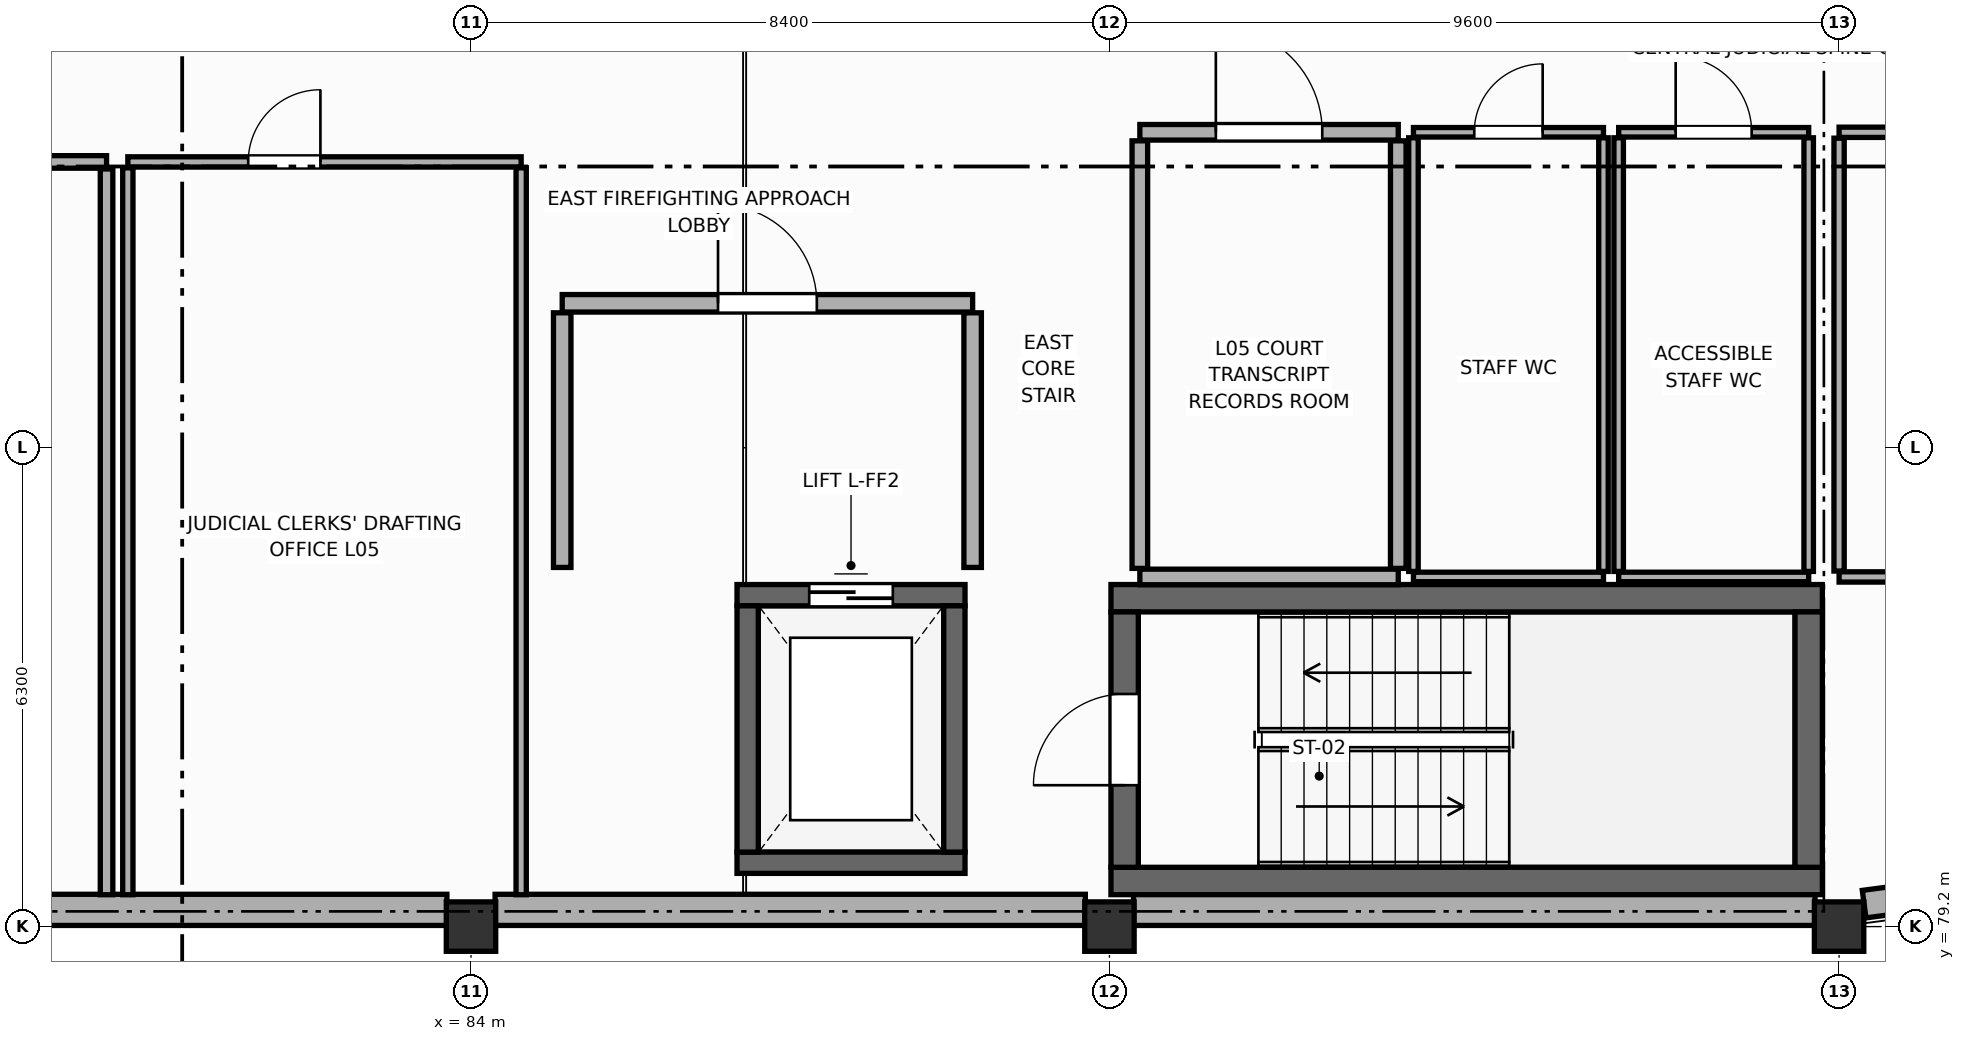
"""IFC4 building model, lengths in metres.
Left out: names, types, materials, properties, quantities, classifications, styles, units other than length and angle.
Written with IfcOpenShell. Run it as: python <this file> out.ifc"""

import sys

from ifc_helpers import new_model, si_unit, direction, frame, frame_2d, origin, origin_2d, place, context, subcontext, project, spatial, rectangle, extrude, element, fill, save


model = new_model("IFC4")
c1 = context("Model", 3, precision=1e-05, world=origin(), true_north=direction((0.0, 1.0)))
c2 = subcontext(c1, "Body", "Model", "MODEL_VIEW")
j1 = project(units=[si_unit("LENGTHUNIT", "METRE"), si_unit("PLANEANGLEUNIT", "RADIAN")], contexts=[c1])
p1 = place(None, origin())
s1 = spatial("IfcSite", under=j1, at=p1, CompositionType="ELEMENT")
p2 = place(p1, origin())
s2 = spatial("IfcBuilding", under=s1, at=p2, CompositionType="ELEMENT")
p3 = place(p2, frame((0.0, 0.0, 18.6)))
s3 = spatial("IfcBuildingStorey", under=s2, at=p3, CompositionType="ELEMENT", Elevation=18.6)
for number, where, z_axis, x_axis in (
    (1, (84.0, 79.2, 0.0), (0.0, 0.0, 1.0), (1.0, 0.0, 0.0)),
    (2, (92.4, 79.2, 0.0), (0.0, 0.0, 1.0), (1.0, 0.0, 0.0)),
    (3, (102.0, 79.2, 0.0), (0.0, 0.0, 1.0), (1.0, 0.0, 0.0)),
):
    element("IfcColumn", number, at=place(p3, frame(where, z_axis=z_axis, x_axis=x_axis)), inside=s3, PredefinedType="COLUMN", context=c2, shape_type="SweptSolid", body=[
        extrude(rectangle(XDim=0.65, YDim=0.65, at=origin_2d()), origin(), (0.0, 0.0, 1.0), 4.2),
    ])
for number, where, z_axis, x_axis in (
    (4, (83.683, 79.42, 0.0), (0.0, 0.0, 1.0), (-1.0, 0.0, 0.0)),
    (5, (92.083, 79.42, 0.0), (0.0, 0.0, 1.0), (-1.0, 0.0, 0.0)),
):
    element("IfcWall", number, at=place(p3, frame(where, z_axis=z_axis, x_axis=x_axis)), inside=s3, PredefinedType="STANDARD", context=c2, shape_type="SweptSolid", body=[
        extrude(rectangle(XDim=7.766, YDim=0.41, at=frame_2d((3.883, 0.0))), origin(), (0.0, 0.0, 1.0), 2.44),
    ])
p4 = place(p3, frame((101.683, 79.42, 0.0), z_axis=(0.0, 0.0, 1.0), x_axis=(-1.0, 0.0, 0.0)))
e6 = element("IfcWall", 6, at=p4, inside=s3, PredefinedType="STANDARD", context=c2, shape_type="SweptSolid", body=[
    extrude(rectangle(XDim=8.966, YDim=0.41, at=frame_2d((4.483, 0.0))), origin(), (0.0, 0.0, 1.0), 2.44),
])
p5 = place(p3, frame((102.329, 79.496, 0.0), z_axis=(0.0, 0.0, 1.0), x_axis=(0.99144889538, 0.13049554724, 0.0)))
e7 = element("IfcWall", 7, at=p5, inside=s3, PredefinedType="ELEMENTEDWALL", context=c2, shape_type="SweptSolid", body=[
    extrude(rectangle(XDim=2.924, YDim=0.365, at=frame_2d((1.462, 0.0))), origin(), (0.0, 0.0, 1.0), 3.09),
])
p6 = place(p5, frame((1.062, 0.0, 0.85)))
e8 = element("IfcOpeningElement", 8, at=p6, cuts=e7, PredefinedType="OPENING", context=c2, shape_type="SweptSolid", body=[
    extrude(rectangle(XDim=0.8, YDim=1.7, at=frame_2d((0.4, 0.85))), frame((0.0, 0.192, 0.0), z_axis=(0.0, -1.0, 0.0), x_axis=(1.0, 0.0, 0.0)), (0.0, 0.0, 1.0), 0.385),
])
for number, where, z_axis, x_axis in (
    (9, (92.42, 83.52, 0.0), (0.0, 0.0, 1.0), (1.0, 0.0, 0.0)),
    (10, (101.78, 79.8, 0.0), (0.0, 0.0, 1.0), (-1.0, 0.0, 0.0)),
):
    element("IfcWall", number, at=place(p3, frame(where, z_axis=z_axis, x_axis=x_axis)), inside=s3, PredefinedType="SHEAR", context=c2, shape_type="SweptSolid", body=[
        extrude(rectangle(XDim=9.36, YDim=0.36, at=frame_2d((4.68, 0.0))), origin(), (0.0, 0.0, 1.0), 3.96),
    ])
p7 = place(p3, frame((92.6, 79.98, 0.0), z_axis=(0.0, 0.0, 1.0), x_axis=(0.0, 1.0, 0.0)))
e11 = element("IfcWall", 11, at=p7, inside=s3, PredefinedType="SHEAR", context=c2, shape_type="SweptSolid", body=[
    extrude(rectangle(XDim=3.36, YDim=0.36, at=frame_2d((1.68, 0.0))), origin(), (0.0, 0.0, 1.0), 3.96),
])
p8 = place(p7, frame((1.08, 0.0, 0.0)))
e12 = element("IfcOpeningElement", 12, at=p8, cuts=e11, PredefinedType="OPENING", context=c2, shape_type="SweptSolid", body=[
    extrude(rectangle(XDim=1.2, YDim=2.2, at=frame_2d((0.6, 1.1))), frame((0.0, 0.19, 0.0), z_axis=(0.0, -1.0, 0.0), x_axis=(1.0, 0.0, 0.0)), (0.0, 0.0, 1.0), 0.38),
])
p9 = place(p3, frame((101.6, 83.34, 0.0), z_axis=(0.0, 0.0, 1.0), x_axis=(0.0, -1.0, 0.0)))
e13 = element("IfcWall", 13, at=p9, inside=s3, PredefinedType="SHEAR", context=c2, shape_type="SweptSolid", body=[
    extrude(rectangle(XDim=3.36, YDim=0.36, at=frame_2d((1.68, 0.0))), origin(), (0.0, 0.0, 1.0), 3.96),
])
p10 = place(p3, frame((87.5, 83.56, 0.0), z_axis=(0.0, 0.0, 1.0), x_axis=(1.0, 0.0, 0.0)))
e14 = element("IfcWall", 14, at=p10, inside=s3, PredefinedType="SHEAR", context=c2, shape_type="SweptSolid", body=[
    extrude(rectangle(XDim=3.0, YDim=0.28, at=frame_2d((1.5, 0.0))), origin(), (0.0, 0.0, 1.0), 3.96),
])
p11 = place(p10, frame((0.95, 0.0, 0.0)))
e15 = element("IfcOpeningElement", 15, at=p11, cuts=e14, PredefinedType="OPENING", context=c2, shape_type="SweptSolid", body=[
    extrude(rectangle(XDim=1.1, YDim=2.2, at=frame_2d((0.55, 1.1))), frame((0.0, 0.15, 0.0), z_axis=(0.0, -1.0, 0.0), x_axis=(1.0, 0.0, 0.0)), (0.0, 0.0, 1.0), 0.3),
])
p12 = place(p3, frame((90.5, 80.04, 0.0), z_axis=(0.0, 0.0, 1.0), x_axis=(-1.0, 0.0, 0.0)))
e16 = element("IfcWall", 16, at=p12, inside=s3, PredefinedType="SHEAR", context=c2, shape_type="SweptSolid", body=[
    extrude(rectangle(XDim=3.0, YDim=0.28, at=frame_2d((1.5, 0.0))), origin(), (0.0, 0.0, 1.0), 3.96),
])
for number, where, z_axis, x_axis in (
    (17, (87.64, 80.18, 0.0), (0.0, 0.0, 1.0), (0.0, 1.0, 0.0)),
    (18, (90.36, 83.42, 0.0), (0.0, 0.0, 1.0), (0.0, -1.0, 0.0)),
):
    element("IfcWall", number, at=place(p3, frame(where, z_axis=z_axis, x_axis=x_axis)), inside=s3, PredefinedType="SHEAR", context=c2, shape_type="SweptSolid", body=[
        extrude(rectangle(XDim=3.24, YDim=0.28, at=frame_2d((1.62, 0.0))), origin(), (0.0, 0.0, 1.0), 3.96),
    ])
p13 = place(p3, frame((85.2, 87.4, 0.0), z_axis=(0.0, 0.0, 1.0), x_axis=(1.0, 0.0, 0.0)))
e19 = element("IfcWall", 19, at=p13, inside=s3, PredefinedType="STANDARD", context=c2, shape_type="SweptSolid", body=[
    extrude(rectangle(XDim=5.4, YDim=0.23, at=frame_2d((2.7, 0.0))), origin(), (0.0, 0.0, 1.0), 3.34),
])
p14 = place(p13, frame((2.05, 0.0, 0.0)))
e20 = element("IfcOpeningElement", 20, at=p14, cuts=e19, PredefinedType="OPENING", context=c2, shape_type="SweptSolid", body=[
    extrude(rectangle(XDim=1.3, YDim=2.2, at=frame_2d((0.65, 1.1))), frame((0.0, 0.125, 0.0), z_axis=(0.0, -1.0, 0.0), x_axis=(1.0, 0.0, 0.0)), (0.0, 0.0, 1.0), 0.25),
])
for number, where, z_axis, x_axis in (
    (21, (85.2, 83.925, 0.0), (0.0, 0.0, 1.0), (0.0, 1.0, 0.0)),
    (22, (90.6, 87.275, 0.0), (0.0, 0.0, 1.0), (0.0, -1.0, 0.0)),
):
    element("IfcWall", number, at=place(p3, frame(where, z_axis=z_axis, x_axis=x_axis)), inside=s3, PredefinedType="STANDARD", context=c2, shape_type="SweptSolid", body=[
        extrude(rectangle(XDim=3.35, YDim=0.23, at=frame_2d((1.675, 0.0))), origin(), (0.0, 0.0, 1.0), 3.34),
    ])
p15 = place(p3, frame((96.4, 89.65, 0.0), z_axis=(0.0, 0.0, 1.0), x_axis=(1.0, 0.0, 0.0)))
e23 = element("IfcWall", 23, at=p15, inside=s3, PredefinedType="PARTITIONING", context=c2, shape_type="SweptSolid", body=[
    extrude(rectangle(XDim=2.5, YDim=0.125, at=frame_2d((1.25, 0.0))), origin(), (0.0, 0.0, 1.0), 3.945),
])
p16 = place(p15, frame((0.8, 0.0, 0.0)))
e24 = element("IfcOpeningElement", 24, at=p16, cuts=e23, PredefinedType="OPENING", context=c2, shape_type="SweptSolid", body=[
    extrude(rectangle(XDim=0.9, YDim=2.1, at=frame_2d((0.45, 1.05))), frame((0.0, 0.073, 0.0), z_axis=(0.0, -1.0, 0.0), x_axis=(1.0, 0.0, 0.0)), (0.0, 0.0, 1.0), 0.145),
])
p17 = place(p3, frame((98.9, 83.8, 0.0), z_axis=(0.0, 0.0, 1.0), x_axis=(-1.0, 0.0, 0.0)))
e25 = element("IfcWall", 25, at=p17, inside=s3, PredefinedType="PARTITIONING", context=c2, shape_type="SweptSolid", body=[
    extrude(rectangle(XDim=2.5, YDim=0.125, at=frame_2d((1.25, 0.0))), origin(), (0.0, 0.0, 1.0), 3.945),
])
for number, where, z_axis, x_axis in (
    (26, (96.4, 83.873, 0.0), (0.0, 0.0, 1.0), (0.0, 1.0, 0.0)),
    (27, (98.9, 89.577, 0.0), (0.0, 0.0, 1.0), (0.0, -1.0, 0.0)),
):
    element("IfcWall", number, at=place(p3, frame(where, z_axis=z_axis, x_axis=x_axis)), inside=s3, PredefinedType="PARTITIONING", context=c2, shape_type="SweptSolid", body=[
        extrude(rectangle(XDim=5.705, YDim=0.125, at=frame_2d((2.853, 0.0))), origin(), (0.0, 0.0, 1.0), 3.34),
    ])
p18 = place(p3, frame((99.1, 89.65, 0.0), z_axis=(0.0, 0.0, 1.0), x_axis=(1.0, 0.0, 0.0)))
e28 = element("IfcWall", 28, at=p18, inside=s3, PredefinedType="PARTITIONING", context=c2, shape_type="SweptSolid", body=[
    extrude(rectangle(XDim=2.5, YDim=0.125, at=frame_2d((1.25, 0.0))), origin(), (0.0, 0.0, 1.0), 3.09),
])
p19 = place(p18, frame((0.75, 0.0, 0.0)))
e29 = element("IfcOpeningElement", 29, at=p19, cuts=e28, PredefinedType="OPENING", context=c2, shape_type="SweptSolid", body=[
    extrude(rectangle(XDim=1.0, YDim=2.1, at=frame_2d((0.5, 1.05))), frame((0.0, 0.073, 0.0), z_axis=(0.0, -1.0, 0.0), x_axis=(1.0, 0.0, 0.0)), (0.0, 0.0, 1.0), 0.145),
])
p20 = place(p3, frame((101.6, 83.8, 0.0), z_axis=(0.0, 0.0, 1.0), x_axis=(-1.0, 0.0, 0.0)))
e30 = element("IfcWall", 30, at=p20, inside=s3, PredefinedType="PARTITIONING", context=c2, shape_type="SweptSolid", body=[
    extrude(rectangle(XDim=2.5, YDim=0.125, at=frame_2d((1.25, 0.0))), origin(), (0.0, 0.0, 1.0), 3.09),
])
p21 = place(p3, frame((99.1, 83.873, 0.0), z_axis=(0.0, 0.0, 1.0), x_axis=(0.0, 1.0, 0.0)))
e31 = element("IfcWall", 31, at=p21, inside=s3, PredefinedType="PARTITIONING", context=c2, shape_type="SweptSolid", body=[
    extrude(rectangle(XDim=5.705, YDim=0.125, at=frame_2d((2.853, 0.0))), origin(), (0.0, 0.0, 1.0), 3.34),
])
p22 = place(p3, frame((101.6, 89.577, 0.0), z_axis=(0.0, 0.0, 1.0), x_axis=(0.0, -1.0, 0.0)))
e32 = element("IfcWall", 32, at=p22, inside=s3, PredefinedType="PARTITIONING", context=c2, shape_type="SweptSolid", body=[
    extrude(rectangle(XDim=5.705, YDim=0.125, at=frame_2d((2.853, 0.0))), origin(), (0.0, 0.0, 1.0), 3.09),
])
p23 = place(p3, frame((92.8, 89.65, 0.0), z_axis=(0.0, 0.0, 1.0), x_axis=(1.0, 0.0, 0.0)))
e33 = element("IfcWall", 33, at=p23, inside=s3, PredefinedType="STANDARD", context=c2, shape_type="SweptSolid", body=[
    extrude(rectangle(XDim=3.4, YDim=0.205, at=frame_2d((1.7, 0.0))), origin(), (0.0, 0.0, 1.0), 2.44),
])
p24 = place(p23, frame((1.0, 0.0, 0.0)))
e34 = element("IfcOpeningElement", 34, at=p24, cuts=e33, PredefinedType="OPENING", context=c2, shape_type="SweptSolid", body=[
    extrude(rectangle(XDim=1.4, YDim=2.25, at=frame_2d((0.7, 1.125))), frame((0.0, 0.113, 0.0), z_axis=(0.0, -1.0, 0.0), x_axis=(1.0, 0.0, 0.0)), (0.0, 0.0, 1.0), 0.225),
])
p25 = place(p3, frame((96.2, 83.8, 0.0), z_axis=(0.0, 0.0, 1.0), x_axis=(-1.0, 0.0, 0.0)))
e35 = element("IfcWall", 35, at=p25, inside=s3, PredefinedType="STANDARD", context=c2, shape_type="SweptSolid", body=[
    extrude(rectangle(XDim=3.4, YDim=0.205, at=frame_2d((1.7, 0.0))), origin(), (0.0, 0.0, 1.0), 2.44),
])
p26 = place(p3, frame((92.8, 83.913, 0.0), z_axis=(0.0, 0.0, 1.0), x_axis=(0.0, 1.0, 0.0)))
e36 = element("IfcWall", 36, at=p26, inside=s3, PredefinedType="STANDARD", context=c2, shape_type="SweptSolid", body=[
    extrude(rectangle(XDim=5.625, YDim=0.205, at=frame_2d((2.812, 0.0))), origin(), (0.0, 0.0, 1.0), 2.44),
])
p27 = place(p3, frame((96.2, 89.538, 0.0), z_axis=(0.0, 0.0, 1.0), x_axis=(0.0, -1.0, 0.0)))
e37 = element("IfcWall", 37, at=p27, inside=s3, PredefinedType="STANDARD", context=c2, shape_type="SweptSolid", body=[
    extrude(rectangle(XDim=5.625, YDim=0.205, at=frame_2d((2.812, 0.0))), origin(), (0.0, 0.0, 1.0), 3.34),
])
p28 = place(p3, frame((74.94, 89.26, 0.0), z_axis=(0.0, 0.0, 1.0), x_axis=(1.0, 0.0, 0.0)))
e38 = element("IfcWall", 38, at=p28, inside=s3, PredefinedType="PARTITIONING", context=c2, shape_type="SweptSolid", body=[
    extrude(rectangle(XDim=4.265, YDim=0.165, at=frame_2d((2.133, 0.0))), origin(), (0.0, 0.0, 1.0), 2.44),
])
p29 = place(p28, frame((1.761, 0.0, 0.0)))
e39 = element("IfcOpeningElement", 39, at=p29, cuts=e38, PredefinedType="OPENING", context=c2, shape_type="SweptSolid", body=[
    extrude(rectangle(XDim=1.0, YDim=2.15, at=frame_2d((0.5, 1.075))), frame((0.0, 0.093, 0.0), z_axis=(0.0, -1.0, 0.0), x_axis=(1.0, 0.0, 0.0)), (0.0, 0.0, 1.0), 0.185),
])
p30 = place(p3, frame((79.205, 89.167, 0.0), z_axis=(0.0, 0.0, 1.0), x_axis=(0.0, -1.0, 0.0)))
e40 = element("IfcWall", 40, at=p30, inside=s3, PredefinedType="PARTITIONING", context=c2, shape_type="SweptSolid", body=[
    extrude(rectangle(XDim=9.549, YDim=0.165, at=frame_2d((4.774, 0.0))), origin(), (0.0, 0.0, 1.0), 3.34),
])
p31 = place(p3, frame((79.485, 89.26, 0.0), z_axis=(0.0, 0.0, 1.0), x_axis=(1.0, 0.0, 0.0)))
e41 = element("IfcWall", 41, at=p31, inside=s3, PredefinedType="PARTITIONING", context=c2, shape_type="SweptSolid", body=[
    extrude(rectangle(XDim=5.175, YDim=0.135, at=frame_2d((2.587, 0.0))), origin(), (0.0, 0.0, 1.0), 2.44),
])
p32 = place(p31, frame((1.584, 0.0, 0.0)))
e42 = element("IfcOpeningElement", 42, at=p32, cuts=e41, PredefinedType="OPENING", context=c2, shape_type="SweptSolid", body=[
    extrude(rectangle(XDim=0.95, YDim=2.15, at=frame_2d((0.475, 1.075))), frame((0.0, 0.077, 0.0), z_axis=(0.0, -1.0, 0.0), x_axis=(1.0, 0.0, 0.0)), (0.0, 0.0, 1.0), 0.155),
])
p33 = place(p3, frame((79.485, 79.619, 0.0), z_axis=(0.0, 0.0, 1.0), x_axis=(0.0, 1.0, 0.0)))
e43 = element("IfcWall", 43, at=p33, inside=s3, PredefinedType="PARTITIONING", context=c2, shape_type="SweptSolid", body=[
    extrude(rectangle(XDim=9.564, YDim=0.135, at=frame_2d((4.782, 0.0))), origin(), (0.0, 0.0, 1.0), 3.34),
])
p34 = place(p3, frame((84.66, 89.183, 0.0), z_axis=(0.0, 0.0, 1.0), x_axis=(0.0, -1.0, 0.0)))
e44 = element("IfcWall", 44, at=p34, inside=s3, PredefinedType="PARTITIONING", context=c2, shape_type="SweptSolid", body=[
    extrude(rectangle(XDim=9.564, YDim=0.135, at=frame_2d((4.782, 0.0))), origin(), (0.0, 0.0, 1.0), 2.44),
])
p35 = place(p3, frame((102.0, 89.65, 0.0), z_axis=(0.0, 0.0, 1.0), x_axis=(1.0, 0.0, 0.0)))
e45 = element("IfcWall", 45, at=p35, inside=s3, PredefinedType="PARTITIONING", context=c2, shape_type="SweptSolid", body=[
    extrude(rectangle(XDim=9.5, YDim=0.135, at=frame_2d((4.75, 0.0))), origin(), (0.0, 0.0, 1.0), 2.99),
])
p36 = place(p35, frame((1.92, 0.0, 0.0)))
e46 = element("IfcOpeningElement", 46, at=p36, cuts=e45, PredefinedType="OPENING", context=c2, shape_type="SweptSolid", body=[
    extrude(rectangle(XDim=0.95, YDim=2.15, at=frame_2d((0.475, 1.075))), frame((0.0, 0.077, 0.0), z_axis=(0.0, -1.0, 0.0), x_axis=(1.0, 0.0, 0.0)), (0.0, 0.0, 1.0), 0.155),
])
p37 = place(p3, frame((111.5, 83.8, 0.0), z_axis=(0.0, 0.0, 1.0), x_axis=(-1.0, 0.0, 0.0)))
e47 = element("IfcWall", 47, at=p37, inside=s3, PredefinedType="PARTITIONING", context=c2, shape_type="SweptSolid", body=[
    extrude(rectangle(XDim=9.5, YDim=0.135, at=frame_2d((4.75, 0.0))), origin(), (0.0, 0.0, 1.0), 2.99),
])
p38 = place(p3, frame((102.0, 83.877, 0.0), z_axis=(0.0, 0.0, 1.0), x_axis=(0.0, 1.0, 0.0)))
e48 = element("IfcWall", 48, at=p38, inside=s3, PredefinedType="PARTITIONING", context=c2, shape_type="SweptSolid", body=[
    extrude(rectangle(XDim=5.695, YDim=0.135, at=frame_2d((2.848, 0.0))), origin(), (0.0, 0.0, 1.0), 3.09),
])
p39 = place(p8, origin())
e49 = element("IfcDoor", 49, at=p39, inside=s3, OperationType="SINGLE_SWING_LEFT", PredefinedType="DOOR", context=c2, shape_type="SweptSolid", body=[
    extrude(rectangle(XDim=1.2, YDim=2.2, at=frame_2d((0.6, 1.1))), frame((0.0, 0.025, 0.0), z_axis=(0.0, -1.0, 0.0), x_axis=(1.0, 0.0, 0.0)), (0.0, 0.0, 1.0), 0.05),
])
fill(e12, e49)
p40 = place(p11, origin())
e50 = element("IfcDoor", 50, at=p40, inside=s3, OperationType="DOUBLE_DOOR_SLIDING", PredefinedType="DOOR", context=c2, shape_type="SweptSolid", body=[
    extrude(rectangle(XDim=1.1, YDim=2.2, at=frame_2d((0.55, 1.1))), frame((0.0, 0.025, 0.0), z_axis=(0.0, -1.0, 0.0), x_axis=(1.0, 0.0, 0.0)), (0.0, 0.0, 1.0), 0.05),
])
fill(e15, e50)
p41 = place(p14, origin())
e51 = element("IfcDoor", 51, at=p41, inside=s3, OperationType="SINGLE_SWING_LEFT", PredefinedType="DOOR", context=c2, shape_type="SweptSolid", body=[
    extrude(rectangle(XDim=1.3, YDim=2.2, at=frame_2d((0.65, 1.1))), frame((0.0, 0.025, 0.0), z_axis=(0.0, -1.0, 0.0), x_axis=(1.0, 0.0, 0.0)), (0.0, 0.0, 1.0), 0.05),
])
fill(e20, e51)
p42 = place(p16, origin())
e52 = element("IfcDoor", 52, at=p42, inside=s3, OperationType="SINGLE_SWING_RIGHT", PredefinedType="DOOR", context=c2, shape_type="SweptSolid", body=[
    extrude(rectangle(XDim=0.9, YDim=2.1, at=frame_2d((0.45, 1.05))), frame((0.0, 0.025, 0.0), z_axis=(0.0, -1.0, 0.0), x_axis=(1.0, 0.0, 0.0)), (0.0, 0.0, 1.0), 0.05),
])
fill(e24, e52)
p43 = place(p19, origin())
e53 = element("IfcDoor", 53, at=p43, inside=s3, OperationType="SINGLE_SWING_LEFT", PredefinedType="DOOR", context=c2, shape_type="SweptSolid", body=[
    extrude(rectangle(XDim=1.0, YDim=2.1, at=frame_2d((0.5, 1.05))), frame((0.0, 0.025, 0.0), z_axis=(0.0, -1.0, 0.0), x_axis=(1.0, 0.0, 0.0)), (0.0, 0.0, 1.0), 0.05),
])
fill(e29, e53)
p44 = place(p24, origin())
e54 = element("IfcDoor", 54, at=p44, inside=s3, OperationType="SINGLE_SWING_LEFT", PredefinedType="DOOR", context=c2, shape_type="SweptSolid", body=[
    extrude(rectangle(XDim=1.4, YDim=2.25, at=frame_2d((0.7, 1.125))), frame((0.0, 0.025, 0.0), z_axis=(0.0, -1.0, 0.0), x_axis=(1.0, 0.0, 0.0)), (0.0, 0.0, 1.0), 0.05),
])
fill(e34, e54)
p45 = place(p32, origin())
e55 = element("IfcDoor", 55, at=p45, inside=s3, OperationType="SINGLE_SWING_RIGHT", PredefinedType="DOOR", context=c2, shape_type="SweptSolid", body=[
    extrude(rectangle(XDim=0.95, YDim=2.15, at=frame_2d((0.475, 1.075))), frame((0.0, 0.025, 0.0), z_axis=(0.0, -1.0, 0.0), x_axis=(1.0, 0.0, 0.0)), (0.0, 0.0, 1.0), 0.05),
])
fill(e42, e55)
save(model, sys.argv[1])
